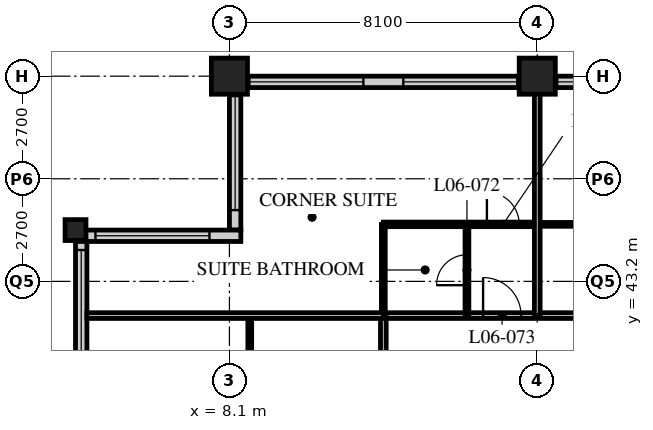
"""IFC4 building model, lengths in metres.
Left out: names, types, materials, properties, quantities, classifications, styles, units other than length and angle.
Written with IfcOpenShell. Run it as: python <this file> out.ifc"""

import sys

from ifc_helpers import new_model, si_unit, direction, frame, frame_2d, origin, origin_2d, place, context, subcontext, project, spatial, rectangle, hollow_rectangle, extrude, element, fill, save


model = new_model("IFC4")
c1 = context("Model", 3, precision=1e-05, world=origin(), true_north=direction((0.0, 1.0)))
c2 = subcontext(c1, "Body", "Model", "MODEL_VIEW")
j1 = project(units=[si_unit("LENGTHUNIT", "METRE"), si_unit("PLANEANGLEUNIT", "RADIAN")], contexts=[c1])
p1 = place(None, origin())
s1 = spatial("IfcSite", under=j1, at=p1, CompositionType="ELEMENT")
p2 = place(p1, origin())
s2 = spatial("IfcBuilding", under=s1, at=p2, CompositionType="ELEMENT")
p3 = place(p2, frame((0.0, 0.0, 33.0)))
s3 = spatial("IfcBuildingStorey", under=s2, at=p3, CompositionType="ELEMENT", Elevation=33.0)
p4 = place(p3, frame((4.05, 44.55, 0.0), z_axis=(0.0, 0.0, 1.0), x_axis=(1.0, 0.0, 0.0)))
e1 = element("IfcColumn", 1, at=p4, inside=s3, PredefinedType="COLUMN", context=c2, shape_type="SweptSolid", body=[
    extrude(hollow_rectangle(XDim=0.55, YDim=0.55, WallThickness=0.05, at=origin_2d()), origin(), (0.0, 0.0, 1.0), 3.4),
])
for number, where, z_axis, x_axis in (
    (2, (8.1, 48.6, 0.0), (0.0, 0.0, 1.0), (1.0, 0.0, 0.0)),
    (3, (16.2, 48.6, 0.0), (0.0, 0.0, 1.0), (1.0, 0.0, 0.0)),
):
    element("IfcColumn", number, at=place(p3, frame(where, z_axis=z_axis, x_axis=x_axis)), inside=s3, PredefinedType="COLUMN", context=c2, shape_type="SweptSolid", body=[
        extrude(hollow_rectangle(XDim=0.95, YDim=0.95, WallThickness=0.095, at=origin_2d()), origin(), (0.0, 0.0, 1.0), 3.4),
    ])
p5 = place(p3, frame((48.3, 48.45, 0.0), z_axis=(0.0, 0.0, 1.0), x_axis=(-1.0, 0.0, 0.0)))
e4 = element("IfcWall", 4, at=p5, inside=s3, PredefinedType="SOLIDWALL", context=c2, shape_type="SweptSolid", body=[
    extrude(rectangle(XDim=40.2, YDim=0.3, at=frame_2d((20.1, 0.0))), origin(), (0.0, 0.0, 1.0), 3.19),
])
p6 = place(p5, frame((0.225, 0.0, 0.9)))
e5 = element("IfcOpeningElement", 5, at=p6, cuts=e4, PredefinedType="OPENING", context=c2, shape_type="SweptSolid", body=[
    extrude(rectangle(XDim=3.0, YDim=2.0, at=frame_2d((1.5, 1.0))), frame((0.0, 0.16, 0.0), z_axis=(0.0, -1.0, 0.0), x_axis=(1.0, 0.0, 0.0)), (0.0, 0.0, 1.0), 0.32),
])
p7 = place(p5, frame((4.275, 0.0, 0.9)))
e6 = element("IfcOpeningElement", 6, at=p7, cuts=e4, PredefinedType="OPENING", context=c2, shape_type="SweptSolid", body=[
    extrude(rectangle(XDim=3.0, YDim=2.0, at=frame_2d((1.5, 1.0))), frame((0.0, 0.16, 0.0), z_axis=(0.0, -1.0, 0.0), x_axis=(1.0, 0.0, 0.0)), (0.0, 0.0, 1.0), 0.32),
])
p8 = place(p5, frame((8.325, 0.0, 0.9)))
e7 = element("IfcOpeningElement", 7, at=p8, cuts=e4, PredefinedType="OPENING", context=c2, shape_type="SweptSolid", body=[
    extrude(rectangle(XDim=3.0, YDim=2.0, at=frame_2d((1.5, 1.0))), frame((0.0, 0.16, 0.0), z_axis=(0.0, -1.0, 0.0), x_axis=(1.0, 0.0, 0.0)), (0.0, 0.0, 1.0), 0.32),
])
p9 = place(p5, frame((12.375, 0.0, 0.9)))
e8 = element("IfcOpeningElement", 8, at=p9, cuts=e4, PredefinedType="OPENING", context=c2, shape_type="SweptSolid", body=[
    extrude(rectangle(XDim=3.0, YDim=2.0, at=frame_2d((1.5, 1.0))), frame((0.0, 0.16, 0.0), z_axis=(0.0, -1.0, 0.0), x_axis=(1.0, 0.0, 0.0)), (0.0, 0.0, 1.0), 0.32),
])
p10 = place(p5, frame((16.425, 0.0, 0.9)))
e9 = element("IfcOpeningElement", 9, at=p10, cuts=e4, PredefinedType="OPENING", context=c2, shape_type="SweptSolid", body=[
    extrude(rectangle(XDim=3.0, YDim=2.0, at=frame_2d((1.5, 1.0))), frame((0.0, 0.16, 0.0), z_axis=(0.0, -1.0, 0.0), x_axis=(1.0, 0.0, 0.0)), (0.0, 0.0, 1.0), 0.32),
])
p11 = place(p5, frame((20.475, 0.0, 0.9)))
e10 = element("IfcOpeningElement", 10, at=p11, cuts=e4, PredefinedType="OPENING", context=c2, shape_type="SweptSolid", body=[
    extrude(rectangle(XDim=3.0, YDim=2.0, at=frame_2d((1.5, 1.0))), frame((0.0, 0.16, 0.0), z_axis=(0.0, -1.0, 0.0), x_axis=(1.0, 0.0, 0.0)), (0.0, 0.0, 1.0), 0.32),
])
p12 = place(p5, frame((24.525, 0.0, 0.9)))
e11 = element("IfcOpeningElement", 11, at=p12, cuts=e4, PredefinedType="OPENING", context=c2, shape_type="SweptSolid", body=[
    extrude(rectangle(XDim=3.0, YDim=2.0, at=frame_2d((1.5, 1.0))), frame((0.0, 0.16, 0.0), z_axis=(0.0, -1.0, 0.0), x_axis=(1.0, 0.0, 0.0)), (0.0, 0.0, 1.0), 0.32),
])
p13 = place(p5, frame((28.575, 0.0, 0.9)))
e12 = element("IfcOpeningElement", 12, at=p13, cuts=e4, PredefinedType="OPENING", context=c2, shape_type="SweptSolid", body=[
    extrude(rectangle(XDim=3.0, YDim=2.0, at=frame_2d((1.5, 1.0))), frame((0.0, 0.16, 0.0), z_axis=(0.0, -1.0, 0.0), x_axis=(1.0, 0.0, 0.0)), (0.0, 0.0, 1.0), 0.32),
])
p14 = place(p5, frame((32.625, 0.0, 0.9)))
e13 = element("IfcOpeningElement", 13, at=p14, cuts=e4, PredefinedType="OPENING", context=c2, shape_type="SweptSolid", body=[
    extrude(rectangle(XDim=3.0, YDim=2.0, at=frame_2d((1.5, 1.0))), frame((0.0, 0.16, 0.0), z_axis=(0.0, -1.0, 0.0), x_axis=(1.0, 0.0, 0.0)), (0.0, 0.0, 1.0), 0.32),
])
p15 = place(p5, frame((36.675, 0.0, 0.9)))
e14 = element("IfcOpeningElement", 14, at=p15, cuts=e4, PredefinedType="OPENING", context=c2, shape_type="SweptSolid", body=[
    extrude(rectangle(XDim=3.0, YDim=2.0, at=frame_2d((1.5, 1.0))), frame((0.0, 0.16, 0.0), z_axis=(0.0, -1.0, 0.0), x_axis=(1.0, 0.0, 0.0)), (0.0, 0.0, 1.0), 0.32),
])
p16 = place(p3, frame((8.25, 48.3, 0.0), z_axis=(0.0, 0.0, 1.0), x_axis=(0.0, -1.0, 0.0)))
e15 = element("IfcWall", 15, at=p16, inside=s3, PredefinedType="SOLIDWALL", context=c2, shape_type="SweptSolid", body=[
    extrude(rectangle(XDim=3.75, YDim=0.3, at=frame_2d((1.875, 0.0))), origin(), (0.0, 0.0, 1.0), 3.19),
])
p17 = place(p16, frame((0.225, 0.0, 0.9)))
e16 = element("IfcOpeningElement", 16, at=p17, cuts=e15, PredefinedType="OPENING", context=c2, shape_type="SweptSolid", body=[
    extrude(rectangle(XDim=3.0, YDim=1.5, at=frame_2d((1.5, 0.75))), frame((0.0, 0.16, 0.0), z_axis=(0.0, -1.0, 0.0), x_axis=(1.0, 0.0, 0.0)), (0.0, 0.0, 1.0), 0.32),
])
p18 = place(p3, frame((8.4, 44.4, 0.0), z_axis=(0.0, 0.0, 1.0), x_axis=(-1.0, 0.0, 0.0)))
e17 = element("IfcWall", 17, at=p18, inside=s3, PredefinedType="SOLIDWALL", context=c2, shape_type="SweptSolid", body=[
    extrude(rectangle(XDim=4.35, YDim=0.3, at=frame_2d((2.175, 0.0))), origin(), (0.0, 0.0, 1.0), 3.19),
])
p19 = place(p18, frame((0.825, 0.0, 0.9)))
e18 = element("IfcOpeningElement", 18, at=p19, cuts=e17, PredefinedType="OPENING", context=c2, shape_type="SweptSolid", body=[
    extrude(rectangle(XDim=3.0, YDim=1.5, at=frame_2d((1.5, 0.75))), frame((0.0, 0.16, 0.0), z_axis=(0.0, -1.0, 0.0), x_axis=(1.0, 0.0, 0.0)), (0.0, 0.0, 1.0), 0.32),
])
p20 = place(p3, frame((4.2, 44.25, 0.0), z_axis=(0.0, 0.0, 1.0), x_axis=(0.0, -1.0, 0.0)))
e19 = element("IfcWall", 19, at=p20, inside=s3, PredefinedType="SOLIDWALL", context=c2, shape_type="SweptSolid", body=[
    extrude(rectangle(XDim=3.75, YDim=0.3, at=frame_2d((1.875, 0.0))), origin(), (0.0, 0.0, 1.0), 3.19),
])
p21 = place(p20, frame((0.225, 0.0, 0.9)))
e20 = element("IfcOpeningElement", 20, at=p21, cuts=e19, PredefinedType="OPENING", context=c2, shape_type="SweptSolid", body=[
    extrude(rectangle(XDim=3.0, YDim=1.5, at=frame_2d((1.5, 0.75))), frame((0.0, 0.16, 0.0), z_axis=(0.0, -1.0, 0.0), x_axis=(1.0, 0.0, 0.0)), (0.0, 0.0, 1.0), 0.32),
])
p22 = place(p3, frame((12.15, 42.3, 0.0), z_axis=(0.0, 0.0, 1.0), x_axis=(1.0, 0.0, 0.0)))
e21 = element("IfcWall", 21, at=p22, inside=s3, PredefinedType="PARTITIONING", context=c2, shape_type="SweptSolid", body=[
    extrude(rectangle(XDim=32.4, YDim=0.15, at=frame_2d((16.2, 0.0))), origin(), (0.0, 0.0, 1.0), 3.19),
])
p23 = place(p22, frame((6.5, 0.0, 0.0)))
e22 = element("IfcOpeningElement", 22, at=p23, cuts=e21, PredefinedType="OPENING", context=c2, shape_type="SweptSolid", body=[
    extrude(rectangle(XDim=1.0, YDim=2.1, at=frame_2d((0.5, 1.05))), frame((0.0, 0.085, 0.0), z_axis=(0.0, -1.0, 0.0), x_axis=(1.0, 0.0, 0.0)), (0.0, 0.0, 1.0), 0.17),
])
p24 = place(p22, frame((8.4, 0.0, 0.0)))
e23 = element("IfcOpeningElement", 23, at=p24, cuts=e21, PredefinedType="OPENING", context=c2, shape_type="SweptSolid", body=[
    extrude(rectangle(XDim=1.0, YDim=2.1, at=frame_2d((0.5, 1.05))), frame((0.0, 0.085, 0.0), z_axis=(0.0, -1.0, 0.0), x_axis=(1.0, 0.0, 0.0)), (0.0, 0.0, 1.0), 0.17),
])
p25 = place(p22, frame((14.6, 0.0, 0.0)))
e24 = element("IfcOpeningElement", 24, at=p25, cuts=e21, PredefinedType="OPENING", context=c2, shape_type="SweptSolid", body=[
    extrude(rectangle(XDim=1.0, YDim=2.1, at=frame_2d((0.5, 1.05))), frame((0.0, 0.085, 0.0), z_axis=(0.0, -1.0, 0.0), x_axis=(1.0, 0.0, 0.0)), (0.0, 0.0, 1.0), 0.17),
])
p26 = place(p22, frame((18.65, 0.0, 0.0)))
e25 = element("IfcOpeningElement", 25, at=p26, cuts=e21, PredefinedType="OPENING", context=c2, shape_type="SweptSolid", body=[
    extrude(rectangle(XDim=1.0, YDim=2.1, at=frame_2d((0.5, 1.05))), frame((0.0, 0.085, 0.0), z_axis=(0.0, -1.0, 0.0), x_axis=(1.0, 0.0, 0.0)), (0.0, 0.0, 1.0), 0.17),
])
p27 = place(p22, frame((23.0, 0.0, 0.0)))
e26 = element("IfcOpeningElement", 26, at=p27, cuts=e21, PredefinedType="OPENING", context=c2, shape_type="SweptSolid", body=[
    extrude(rectangle(XDim=1.0, YDim=2.1, at=frame_2d((0.5, 1.05))), frame((0.0, 0.085, 0.0), z_axis=(0.0, -1.0, 0.0), x_axis=(1.0, 0.0, 0.0)), (0.0, 0.0, 1.0), 0.17),
])
p28 = place(p22, frame((26.75, 0.0, 0.0)))
e27 = element("IfcOpeningElement", 27, at=p28, cuts=e21, PredefinedType="OPENING", context=c2, shape_type="SweptSolid", body=[
    extrude(rectangle(XDim=1.0, YDim=2.1, at=frame_2d((0.5, 1.05))), frame((0.0, 0.085, 0.0), z_axis=(0.0, -1.0, 0.0), x_axis=(1.0, 0.0, 0.0)), (0.0, 0.0, 1.0), 0.17),
])
p29 = place(p22, frame((28.775, 0.0, 0.0)))
e28 = element("IfcOpeningElement", 28, at=p29, cuts=e21, PredefinedType="OPENING", context=c2, shape_type="SweptSolid", body=[
    extrude(rectangle(XDim=1.0, YDim=2.1, at=frame_2d((0.5, 1.05))), frame((0.0, 0.085, 0.0), z_axis=(0.0, -1.0, 0.0), x_axis=(1.0, 0.0, 0.0)), (0.0, 0.0, 1.0), 0.17),
])
p30 = place(p22, frame((2.625, 0.0, 0.0)))
e29 = element("IfcOpeningElement", 29, at=p30, cuts=e21, PredefinedType="OPENING", context=c2, shape_type="SweptSolid", body=[
    extrude(rectangle(XDim=1.0, YDim=2.1, at=frame_2d((0.5, 1.05))), frame((0.0, 0.085, 0.0), z_axis=(0.0, -1.0, 0.0), x_axis=(1.0, 0.0, 0.0)), (0.0, 0.0, 1.0), 0.17),
])
p31 = place(p3, frame((12.15, 16.2, 0.0), z_axis=(0.0, 0.0, 1.0), x_axis=(0.0, 1.0, 0.0)))
e30 = element("IfcWall", 30, at=p31, inside=s3, PredefinedType="PARTITIONING", context=c2, shape_type="SweptSolid", body=[
    extrude(rectangle(XDim=26.1, YDim=0.15, at=frame_2d((13.05, 0.0))), origin(), (0.0, 0.0, 1.0), 3.19),
])
p32 = place(p31, frame((2.75, 0.0, 0.0)))
e31 = element("IfcOpeningElement", 31, at=p32, cuts=e30, PredefinedType="OPENING", context=c2, shape_type="SweptSolid", body=[
    extrude(rectangle(XDim=1.0, YDim=2.1, at=frame_2d((0.5, 1.05))), frame((0.0, 0.085, 0.0), z_axis=(0.0, -1.0, 0.0), x_axis=(1.0, 0.0, 0.0)), (0.0, 0.0, 1.0), 0.17),
])
p33 = place(p31, frame((4.35, 0.0, 0.0)))
e32 = element("IfcOpeningElement", 32, at=p33, cuts=e30, PredefinedType="OPENING", context=c2, shape_type="SweptSolid", body=[
    extrude(rectangle(XDim=1.0, YDim=2.1, at=frame_2d((0.5, 1.05))), frame((0.0, 0.085, 0.0), z_axis=(0.0, -1.0, 0.0), x_axis=(1.0, 0.0, 0.0)), (0.0, 0.0, 1.0), 0.17),
])
p34 = place(p31, frame((10.55, 0.0, 0.0)))
e33 = element("IfcOpeningElement", 33, at=p34, cuts=e30, PredefinedType="OPENING", context=c2, shape_type="SweptSolid", body=[
    extrude(rectangle(XDim=1.0, YDim=2.1, at=frame_2d((0.5, 1.05))), frame((0.0, 0.085, 0.0), z_axis=(0.0, -1.0, 0.0), x_axis=(1.0, 0.0, 0.0)), (0.0, 0.0, 1.0), 0.17),
])
p35 = place(p31, frame((12.45, 0.0, 0.0)))
e34 = element("IfcOpeningElement", 34, at=p35, cuts=e30, PredefinedType="OPENING", context=c2, shape_type="SweptSolid", body=[
    extrude(rectangle(XDim=1.0, YDim=2.1, at=frame_2d((0.5, 1.05))), frame((0.0, 0.085, 0.0), z_axis=(0.0, -1.0, 0.0), x_axis=(1.0, 0.0, 0.0)), (0.0, 0.0, 1.0), 0.17),
])
p36 = place(p31, frame((18.65, 0.0, 0.0)))
e35 = element("IfcOpeningElement", 35, at=p36, cuts=e30, PredefinedType="OPENING", context=c2, shape_type="SweptSolid", body=[
    extrude(rectangle(XDim=1.0, YDim=2.1, at=frame_2d((0.5, 1.05))), frame((0.0, 0.085, 0.0), z_axis=(0.0, -1.0, 0.0), x_axis=(1.0, 0.0, 0.0)), (0.0, 0.0, 1.0), 0.17),
])
p37 = place(p31, frame((22.65, 0.0, 0.0)))
e36 = element("IfcOpeningElement", 36, at=p37, cuts=e30, PredefinedType="OPENING", context=c2, shape_type="SweptSolid", body=[
    extrude(rectangle(XDim=1.0, YDim=2.1, at=frame_2d((0.5, 1.05))), frame((0.0, 0.085, 0.0), z_axis=(0.0, -1.0, 0.0), x_axis=(1.0, 0.0, 0.0)), (0.0, 0.0, 1.0), 0.17),
])
for number, where, z_axis, x_axis in (
    (37, (16.2, 44.7, 0.0), (0.0, 0.0, 1.0), (1.0, 0.0, 0.0)),
    (38, (8.635, 40.0, 0.0), (0.0, 0.0, 1.0), (0.0, 1.0, 0.0)),
):
    element("IfcWall", number, at=place(p3, frame(where, z_axis=z_axis, x_axis=x_axis)), inside=s3, PredefinedType="PARTITIONING", context=c2, shape_type="SweptSolid", body=[
        extrude(rectangle(XDim=2.3, YDim=0.1, at=frame_2d((1.15, 0.0))), origin(), (0.0, 0.0, 1.0), 3.19),
    ])
p38 = place(p3, frame((12.15, 44.7, 0.0), z_axis=(0.0, 0.0, 1.0), x_axis=(1.0, 0.0, 0.0)))
e39 = element("IfcWall", 39, at=p38, inside=s3, PredefinedType="PARTITIONING", context=c2, shape_type="SweptSolid", body=[
    extrude(rectangle(XDim=4.05, YDim=0.12, at=frame_2d((2.025, 0.0))), origin(), (0.0, 0.0, 1.0), 3.19),
])
p39 = place(p38, frame((2.725, 0.0, 0.0)))
e40 = element("IfcOpeningElement", 40, at=p39, cuts=e39, PredefinedType="OPENING", context=c2, shape_type="SweptSolid", body=[
    extrude(rectangle(XDim=0.85, YDim=2.1, at=frame_2d((0.425, 1.05))), frame((0.0, 0.07, 0.0), z_axis=(0.0, -1.0, 0.0), x_axis=(1.0, 0.0, 0.0)), (0.0, 0.0, 1.0), 0.14),
])
p40 = place(p3, frame((14.35, 42.3, 0.0), z_axis=(0.0, 0.0, 1.0), x_axis=(0.0, 1.0, 0.0)))
e41 = element("IfcWall", 41, at=p40, inside=s3, PredefinedType="PARTITIONING", context=c2, shape_type="SweptSolid", body=[
    extrude(rectangle(XDim=2.4, YDim=0.1, at=frame_2d((1.2, 0.0))), origin(), (0.0, 0.0, 1.0), 3.19),
])
p41 = place(p40, frame((0.8, 0.0, 0.0)))
e42 = element("IfcOpeningElement", 42, at=p41, cuts=e41, PredefinedType="OPENING", context=c2, shape_type="SweptSolid", body=[
    extrude(rectangle(XDim=0.8, YDim=2.1, at=frame_2d((0.4, 1.05))), frame((0.0, 0.06, 0.0), z_axis=(0.0, -1.0, 0.0), x_axis=(1.0, 0.0, 0.0)), (0.0, 0.0, 1.0), 0.12),
])
p42 = place(p3, frame((12.15, 42.3, 0.0), z_axis=(0.0, 0.0, 1.0), x_axis=(0.0, 1.0, 0.0)))
e43 = element("IfcWall", 43, at=p42, inside=s3, PredefinedType="PARTITIONING", context=c2, shape_type="SweptSolid", body=[
    extrude(rectangle(XDim=2.4, YDim=0.1, at=frame_2d((1.2, 0.0))), origin(), (0.0, 0.0, 1.0), 3.19),
])
p43 = place(p3, frame((4.35, 42.3, 0.0), z_axis=(0.0, 0.0, 1.0), x_axis=(1.0, 0.0, 0.0)))
e44 = element("IfcWall", 44, at=p43, inside=s3, PredefinedType="PARTITIONING", context=c2, shape_type="SweptSolid", body=[
    extrude(rectangle(XDim=7.8, YDim=0.15, at=frame_2d((3.9, 0.0))), origin(), (0.0, 0.0, 1.0), 3.19),
])
p44 = place(p3, frame((16.2, 42.3, 0.0), z_axis=(0.0, 0.0, 1.0), x_axis=(0.0, 1.0, 0.0)))
e45 = element("IfcWall", 45, at=p44, inside=s3, PredefinedType="PARTITIONING", context=c2, shape_type="SweptSolid", body=[
    extrude(rectangle(XDim=6.0, YDim=0.15, at=frame_2d((3.0, 0.0))), origin(), (0.0, 0.0, 1.0), 2.578),
])
p45 = place(p13, origin())
e46 = element("IfcWindow", 46, at=p45, inside=s3, PartitioningType="SINGLE_PANEL", PredefinedType="WINDOW", context=c2, shape_type="SweptSolid", body=[
    extrude(rectangle(XDim=3.0, YDim=2.0, at=frame_2d((1.5, 1.0))), frame((0.0, 0.03, 0.0), z_axis=(0.0, -1.0, 0.0), x_axis=(1.0, 0.0, 0.0)), (0.0, 0.0, 1.0), 0.06),
])
fill(e12, e46)
p46 = place(p14, origin())
e47 = element("IfcWindow", 47, at=p46, inside=s3, PartitioningType="SINGLE_PANEL", PredefinedType="WINDOW", context=c2, shape_type="SweptSolid", body=[
    extrude(rectangle(XDim=3.0, YDim=2.0, at=frame_2d((1.5, 1.0))), frame((0.0, 0.03, 0.0), z_axis=(0.0, -1.0, 0.0), x_axis=(1.0, 0.0, 0.0)), (0.0, 0.0, 1.0), 0.06),
])
fill(e13, e47)
p47 = place(p15, origin())
e48 = element("IfcWindow", 48, at=p47, inside=s3, PartitioningType="SINGLE_PANEL", PredefinedType="WINDOW", context=c2, shape_type="SweptSolid", body=[
    extrude(rectangle(XDim=3.0, YDim=2.0, at=frame_2d((1.5, 1.0))), frame((0.0, 0.03, 0.0), z_axis=(0.0, -1.0, 0.0), x_axis=(1.0, 0.0, 0.0)), (0.0, 0.0, 1.0), 0.06),
])
fill(e14, e48)
p48 = place(p17, origin())
e49 = element("IfcWindow", 49, at=p48, inside=s3, PartitioningType="SINGLE_PANEL", PredefinedType="WINDOW", context=c2, shape_type="SweptSolid", body=[
    extrude(rectangle(XDim=3.0, YDim=1.5, at=frame_2d((1.5, 0.75))), frame((0.0, 0.03, 0.0), z_axis=(0.0, -1.0, 0.0), x_axis=(1.0, 0.0, 0.0)), (0.0, 0.0, 1.0), 0.06),
])
fill(e16, e49)
p49 = place(p19, origin())
e50 = element("IfcWindow", 50, at=p49, inside=s3, PartitioningType="SINGLE_PANEL", PredefinedType="WINDOW", context=c2, shape_type="SweptSolid", body=[
    extrude(rectangle(XDim=3.0, YDim=1.5, at=frame_2d((1.5, 0.75))), frame((0.0, 0.03, 0.0), z_axis=(0.0, -1.0, 0.0), x_axis=(1.0, 0.0, 0.0)), (0.0, 0.0, 1.0), 0.06),
])
fill(e18, e50)
p50 = place(p21, origin())
e51 = element("IfcWindow", 51, at=p50, inside=s3, PartitioningType="SINGLE_PANEL", PredefinedType="WINDOW", context=c2, shape_type="SweptSolid", body=[
    extrude(rectangle(XDim=3.0, YDim=1.5, at=frame_2d((1.5, 0.75))), frame((0.0, 0.03, 0.0), z_axis=(0.0, -1.0, 0.0), x_axis=(1.0, 0.0, 0.0)), (0.0, 0.0, 1.0), 0.06),
])
fill(e20, e51)
p51 = place(p41, origin())
e52 = element("IfcDoor", 52, at=p51, inside=s3, OperationType="SINGLE_SWING_LEFT", PredefinedType="DOOR", context=c2, shape_type="SweptSolid", body=[
    extrude(rectangle(XDim=0.8, YDim=2.1, at=frame_2d((0.4, 1.05))), frame((0.0, 0.025, 0.0), z_axis=(0.0, -1.0, 0.0), x_axis=(1.0, 0.0, 0.0)), (0.0, 0.0, 1.0), 0.05),
])
fill(e42, e52)
p52 = place(p30, origin())
e53 = element("IfcDoor", 53, at=p52, inside=s3, OperationType="SINGLE_SWING_LEFT", PredefinedType="DOOR", context=c2, shape_type="SweptSolid", body=[
    extrude(rectangle(XDim=1.0, YDim=2.1, at=frame_2d((0.5, 1.05))), frame((0.0, 0.025, 0.0), z_axis=(0.0, -1.0, 0.0), x_axis=(1.0, 0.0, 0.0)), (0.0, 0.0, 1.0), 0.05),
])
fill(e29, e53)
p53 = place(p39, origin())
e54 = element("IfcDoor", 54, at=p53, inside=s3, OperationType="SINGLE_SWING_LEFT", PredefinedType="DOOR", context=c2, shape_type="SweptSolid", body=[
    extrude(rectangle(XDim=0.85, YDim=2.1, at=frame_2d((0.425, 1.05))), frame((0.0, 0.025, 0.0), z_axis=(0.0, -1.0, 0.0), x_axis=(1.0, 0.0, 0.0)), (0.0, 0.0, 1.0), 0.05),
])
fill(e40, e54)
save(model, sys.argv[1])
